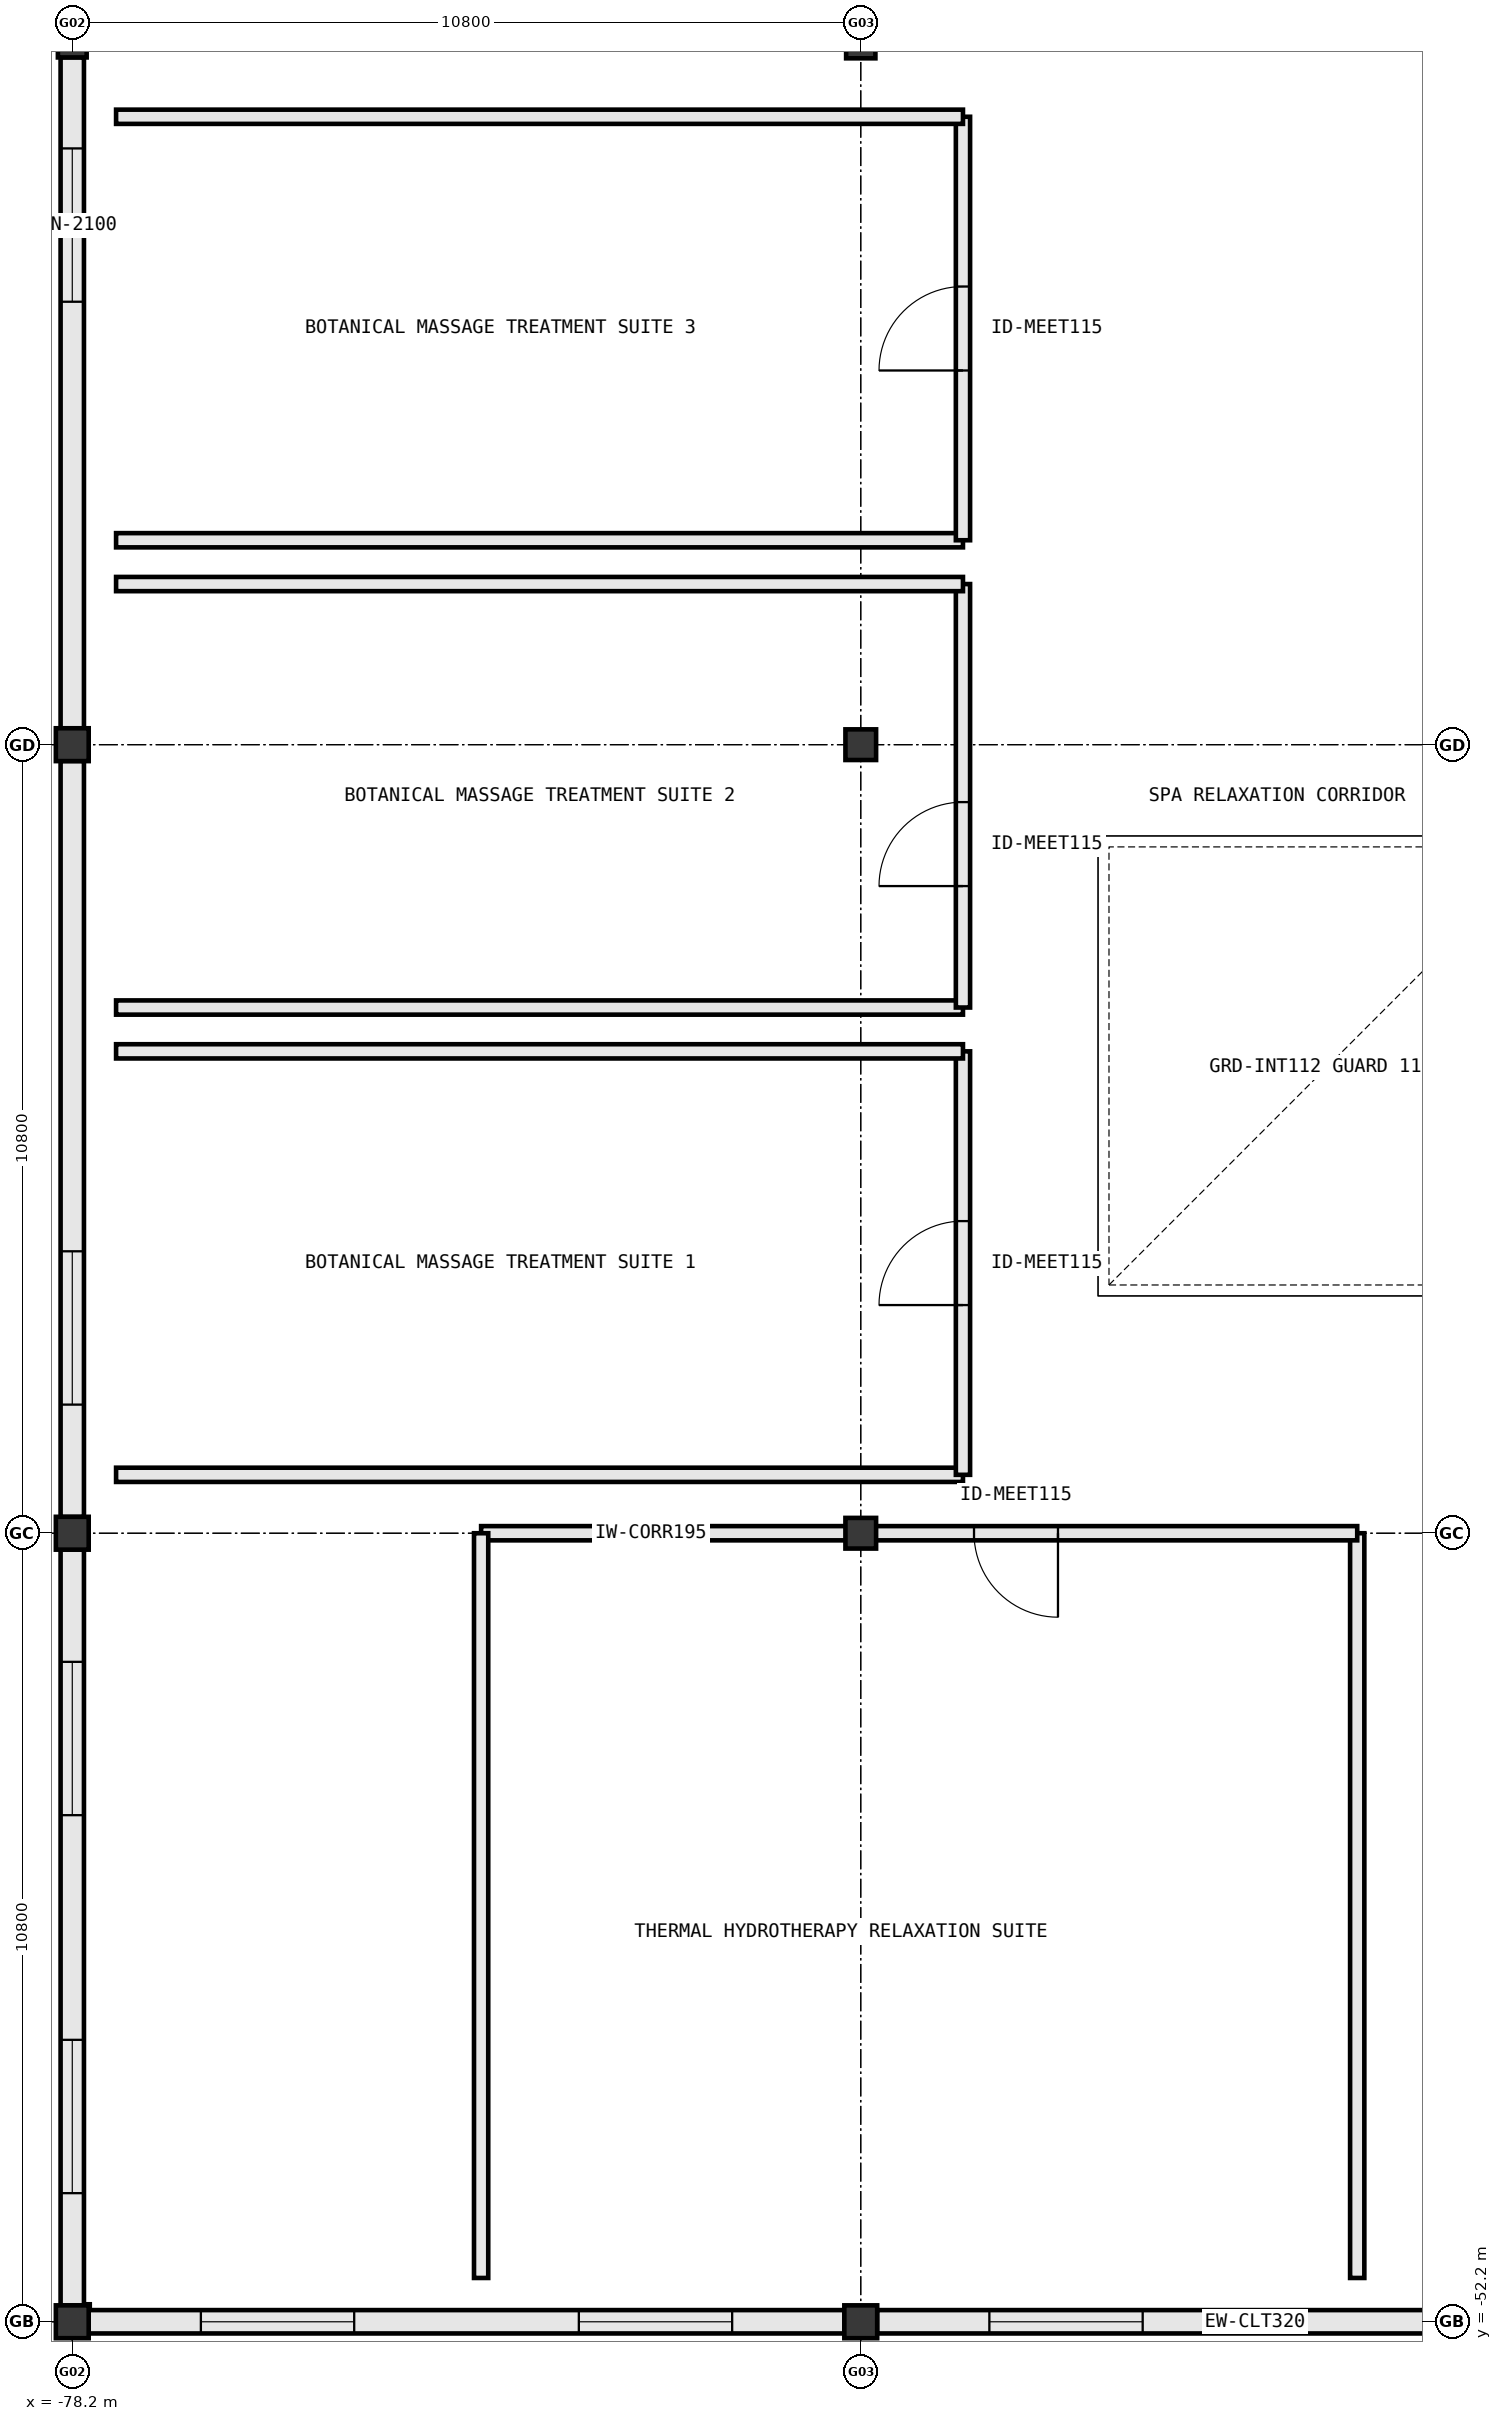
"""IFC4 building model, lengths in metres.
Left out: names, types, materials, properties, quantities, classifications, styles, units other than length and angle.
Written with IfcOpenShell. Run it as: python <this file> out.ifc"""

import sys

from ifc_helpers import new_model, si_unit, direction, frame, frame_2d, origin, origin_2d, place, context, subcontext, project, spatial, rectangle, i_section, extrude, element, fill, save


model = new_model("IFC4")
c1 = context("Model", 3, precision=1e-05, world=origin(), true_north=direction((0.0, 1.0)))
c2 = subcontext(c1, "Body", "Model", "MODEL_VIEW")
j1 = project(units=[si_unit("LENGTHUNIT", "METRE"), si_unit("PLANEANGLEUNIT", "RADIAN")], contexts=[c1])
p1 = place(None, origin())
s1 = spatial("IfcSite", under=j1, at=p1, CompositionType="ELEMENT")
p2 = place(p1, origin())
s2 = spatial("IfcBuilding", under=s1, at=p2, CompositionType="ELEMENT")
p3 = place(p2, frame((0.0, 0.0, 5.4)))
s3 = spatial("IfcBuildingStorey", under=s2, at=p3, CompositionType="ELEMENT", Elevation=5.4)
p4 = place(p3, frame((-78.2, -21.0, 0.0), z_axis=(0.0, 0.0, 1.0), x_axis=(1.0, 0.0, 0.0)))
e1 = element("IfcColumn", 1, at=p4, inside=s3, PredefinedType="COLUMN", context=c2, shape_type="SweptSolid", body=[
    extrude(i_section(OverallWidth=0.394, OverallDepth=0.375, WebThickness=0.017, FlangeThickness=0.028, at=origin_2d()), origin(), (0.0, 0.0, 1.0), 5.4),
])
p5 = place(p3, frame((-67.4, -21.0, 0.0), z_axis=(0.0, 0.0, 1.0), x_axis=(1.0, 0.0, 0.0)))
e2 = element("IfcColumn", 2, at=p5, inside=s3, PredefinedType="COLUMN", context=c2, shape_type="SweptSolid", body=[
    extrude(i_section(OverallWidth=0.401, OverallDepth=0.399, WebThickness=0.025, FlangeThickness=0.04, at=origin_2d()), origin(), (0.0, 0.0, 1.0), 5.4),
])
for number, where, z_axis, x_axis in (
    (3, (-78.2, -52.2, 0.0), (0.0, 0.0, 1.0), (1.0, 0.0, 0.0)),
    (4, (-78.2, -41.4, 0.0), (0.0, 0.0, 1.0), (1.0, 0.0, 0.0)),
    (5, (-78.2, -30.6, 0.0), (0.0, 0.0, 1.0), (1.0, 0.0, 0.0)),
    (6, (-67.4, -52.2, 0.0), (0.0, 0.0, 1.0), (1.0, 0.0, 0.0)),
):
    element("IfcColumn", number, at=place(p3, frame(where, z_axis=z_axis, x_axis=x_axis)), inside=s3, PredefinedType="COLUMN", context=c2, shape_type="SweptSolid", body=[
        extrude(rectangle(XDim=0.45, YDim=0.45, at=origin_2d()), origin(), (0.0, 0.0, 1.0), 5.4),
    ])
for number, where, z_axis, x_axis in (
    (7, (-67.4, -41.4, 0.0), (0.0, 0.0, 1.0), (1.0, 0.0, 0.0)),
    (8, (-67.4, -30.6, 0.0), (0.0, 0.0, 1.0), (1.0, 0.0, 0.0)),
):
    element("IfcColumn", number, at=place(p3, frame(where, z_axis=z_axis, x_axis=x_axis)), inside=s3, PredefinedType="COLUMN", context=c2, shape_type="SweptSolid", body=[
        extrude(rectangle(XDim=0.42, YDim=0.42, at=origin_2d()), origin(), (0.0, 0.0, 1.0), 5.4),
    ])
p6 = place(p3, frame((-78.2, -21.186, 0.0), z_axis=(0.0, 0.0, 1.0), x_axis=(0.0, -1.0, 0.0)))
e9 = element("IfcWall", 9, at=p6, inside=s3, PredefinedType="STANDARD", context=c2, shape_type="SweptSolid", body=[
    extrude(rectangle(XDim=9.191, YDim=0.32, at=frame_2d((4.596, 0.0))), origin(), (0.0, 0.0, 1.0), 4.429),
])
p7 = place(p6, frame((1.248, 0.0, 0.85)))
e10 = element("IfcOpeningElement", 10, at=p7, cuts=e9, PredefinedType="OPENING", context=c2, shape_type="SweptSolid", body=[
    extrude(rectangle(XDim=2.1, YDim=1.95, at=frame_2d((1.05, 0.975))), frame((0.0, 0.172, 0.0), z_axis=(0.0, -1.0, 0.0), x_axis=(1.0, 0.0, 0.0)), (0.0, 0.0, 1.0), 0.344),
])
p8 = place(p3, frame((-78.2, -30.823, 0.0), z_axis=(0.0, 0.0, 1.0), x_axis=(0.0, -1.0, 0.0)))
e11 = element("IfcWall", 11, at=p8, inside=s3, PredefinedType="STANDARD", context=c2, shape_type="SweptSolid", body=[
    extrude(rectangle(XDim=10.354, YDim=0.32, at=frame_2d((5.177, 0.0))), origin(), (0.0, 0.0, 1.0), 4.429),
])
p9 = place(p8, frame((6.716, 0.0, 0.85)))
e12 = element("IfcOpeningElement", 12, at=p9, cuts=e11, PredefinedType="OPENING", context=c2, shape_type="SweptSolid", body=[
    extrude(rectangle(XDim=2.1, YDim=1.95, at=frame_2d((1.05, 0.975))), frame((0.0, 0.172, 0.0), z_axis=(0.0, -1.0, 0.0), x_axis=(1.0, 0.0, 0.0)), (0.0, 0.0, 1.0), 0.344),
])
p10 = place(p3, frame((-78.2, -41.623, 0.0), z_axis=(0.0, 0.0, 1.0), x_axis=(0.0, -1.0, 0.0)))
e13 = element("IfcWall", 13, at=p10, inside=s3, PredefinedType="STANDARD", context=c2, shape_type="SweptSolid", body=[
    extrude(rectangle(XDim=10.354, YDim=0.32, at=frame_2d((5.177, 0.0))), origin(), (0.0, 0.0, 1.0), 4.429),
])
p11 = place(p10, frame((1.539, 0.0, 0.85)))
e14 = element("IfcOpeningElement", 14, at=p11, cuts=e13, PredefinedType="OPENING", context=c2, shape_type="SweptSolid", body=[
    extrude(rectangle(XDim=2.1, YDim=1.95, at=frame_2d((1.05, 0.975))), frame((0.0, 0.172, 0.0), z_axis=(0.0, -1.0, 0.0), x_axis=(1.0, 0.0, 0.0)), (0.0, 0.0, 1.0), 0.344),
])
p12 = place(p10, frame((6.716, 0.0, 0.85)))
e15 = element("IfcOpeningElement", 15, at=p12, cuts=e13, PredefinedType="OPENING", context=c2, shape_type="SweptSolid", body=[
    extrude(rectangle(XDim=2.1, YDim=1.95, at=frame_2d((1.05, 0.975))), frame((0.0, 0.172, 0.0), z_axis=(0.0, -1.0, 0.0), x_axis=(1.0, 0.0, 0.0)), (0.0, 0.0, 1.0), 0.344),
])
p13 = place(p3, frame((-77.977, -52.2, 0.0), z_axis=(0.0, 0.0, 1.0), x_axis=(1.0, 0.0, 0.0)))
e16 = element("IfcWall", 16, at=p13, inside=s3, PredefinedType="STANDARD", context=c2, shape_type="SweptSolid", body=[
    extrude(rectangle(XDim=10.354, YDim=0.32, at=frame_2d((5.177, 0.0))), origin(), (0.0, 0.0, 1.0), 4.346),
])
p14 = place(p13, frame((1.539, 0.0, 0.85)))
e17 = element("IfcOpeningElement", 17, at=p14, cuts=e16, PredefinedType="OPENING", context=c2, shape_type="SweptSolid", body=[
    extrude(rectangle(XDim=2.1, YDim=1.95, at=frame_2d((1.05, 0.975))), frame((0.0, 0.172, 0.0), z_axis=(0.0, -1.0, 0.0), x_axis=(1.0, 0.0, 0.0)), (0.0, 0.0, 1.0), 0.344),
])
p15 = place(p13, frame((6.716, 0.0, 0.85)))
e18 = element("IfcOpeningElement", 18, at=p15, cuts=e16, PredefinedType="OPENING", context=c2, shape_type="SweptSolid", body=[
    extrude(rectangle(XDim=2.1, YDim=1.95, at=frame_2d((1.05, 0.975))), frame((0.0, 0.172, 0.0), z_axis=(0.0, -1.0, 0.0), x_axis=(1.0, 0.0, 0.0)), (0.0, 0.0, 1.0), 0.344),
])
p16 = place(p3, frame((-67.177, -52.2, 0.0), z_axis=(0.0, 0.0, 1.0), x_axis=(1.0, 0.0, 0.0)))
e19 = element("IfcWall", 19, at=p16, inside=s3, PredefinedType="STANDARD", context=c2, shape_type="SweptSolid", body=[
    extrude(rectangle(XDim=10.354, YDim=0.32, at=frame_2d((5.177, 0.0))), origin(), (0.0, 0.0, 1.0), 4.346),
])
p17 = place(p16, frame((1.539, 0.0, 0.85)))
e20 = element("IfcOpeningElement", 20, at=p17, cuts=e19, PredefinedType="OPENING", context=c2, shape_type="SweptSolid", body=[
    extrude(rectangle(XDim=2.1, YDim=1.95, at=frame_2d((1.05, 0.975))), frame((0.0, 0.172, 0.0), z_axis=(0.0, -1.0, 0.0), x_axis=(1.0, 0.0, 0.0)), (0.0, 0.0, 1.0), 0.344),
])
p18 = place(p3, frame((-77.6, -40.6, 0.0), z_axis=(0.0, 0.0, 1.0), x_axis=(1.0, 0.0, 0.0)))
e21 = element("IfcWall", 21, at=p18, inside=s3, PredefinedType="PARTITIONING", context=c2, shape_type="SweptSolid", body=[
    extrude(rectangle(XDim=11.6, YDim=0.195, at=frame_2d((5.8, 0.0))), origin(), (0.0, 0.0, 1.0), 5.13),
])
p19 = place(p3, frame((-66.0, -40.6, 0.0), z_axis=(0.0, 0.0, 1.0), x_axis=(0.0, 1.0, 0.0)))
e22 = element("IfcWall", 22, at=p19, inside=s3, PredefinedType="PARTITIONING", context=c2, shape_type="SweptSolid", body=[
    extrude(rectangle(XDim=5.8, YDim=0.195, at=frame_2d((2.9, 0.0))), origin(), (0.0, 0.0, 1.0), 5.13),
])
p20 = place(p19, frame((2.325, 0.0, 0.0)))
e23 = element("IfcOpeningElement", 23, at=p20, cuts=e22, PredefinedType="OPENING", context=c2, shape_type="SweptSolid", body=[
    extrude(rectangle(XDim=1.15, YDim=2.2, at=frame_2d((0.575, 1.1))), frame((0.0, 0.11, 0.0), z_axis=(0.0, -1.0, 0.0), x_axis=(1.0, 0.0, 0.0)), (0.0, 0.0, 1.0), 0.219),
])
for number, where, z_axis, x_axis in (
    (24, (-66.0, -34.8, 0.0), (0.0, 0.0, 1.0), (-1.0, 0.0, 0.0)),
    (25, (-77.6, -34.2, 0.0), (0.0, 0.0, 1.0), (1.0, 0.0, 0.0)),
):
    element("IfcWall", number, at=place(p3, frame(where, z_axis=z_axis, x_axis=x_axis)), inside=s3, PredefinedType="PARTITIONING", context=c2, shape_type="SweptSolid", body=[
        extrude(rectangle(XDim=11.6, YDim=0.195, at=frame_2d((5.8, 0.0))), origin(), (0.0, 0.0, 1.0), 5.13),
    ])
p21 = place(p3, frame((-66.0, -34.2, 0.0), z_axis=(0.0, 0.0, 1.0), x_axis=(0.0, 1.0, 0.0)))
e26 = element("IfcWall", 26, at=p21, inside=s3, PredefinedType="PARTITIONING", context=c2, shape_type="SweptSolid", body=[
    extrude(rectangle(XDim=5.8, YDim=0.195, at=frame_2d((2.9, 0.0))), origin(), (0.0, 0.0, 1.0), 5.13),
])
p22 = place(p21, frame((1.664, 0.0, 0.0)))
e27 = element("IfcOpeningElement", 27, at=p22, cuts=e26, PredefinedType="OPENING", context=c2, shape_type="SweptSolid", body=[
    extrude(rectangle(XDim=1.15, YDim=2.2, at=frame_2d((0.575, 1.1))), frame((0.0, 0.11, 0.0), z_axis=(0.0, -1.0, 0.0), x_axis=(1.0, 0.0, 0.0)), (0.0, 0.0, 1.0), 0.219),
])
for number, where, z_axis, x_axis in (
    (28, (-66.0, -28.4, 0.0), (0.0, 0.0, 1.0), (-1.0, 0.0, 0.0)),
    (29, (-77.6, -27.8, 0.0), (0.0, 0.0, 1.0), (1.0, 0.0, 0.0)),
):
    element("IfcWall", number, at=place(p3, frame(where, z_axis=z_axis, x_axis=x_axis)), inside=s3, PredefinedType="PARTITIONING", context=c2, shape_type="SweptSolid", body=[
        extrude(rectangle(XDim=11.6, YDim=0.195, at=frame_2d((5.8, 0.0))), origin(), (0.0, 0.0, 1.0), 5.13),
    ])
p23 = place(p3, frame((-66.0, -27.8, 0.0), z_axis=(0.0, 0.0, 1.0), x_axis=(0.0, 1.0, 0.0)))
e30 = element("IfcWall", 30, at=p23, inside=s3, PredefinedType="PARTITIONING", context=c2, shape_type="SweptSolid", body=[
    extrude(rectangle(XDim=5.8, YDim=0.195, at=frame_2d((2.9, 0.0))), origin(), (0.0, 0.0, 1.0), 5.13),
])
p24 = place(p23, frame((2.325, 0.0, 0.0)))
e31 = element("IfcOpeningElement", 31, at=p24, cuts=e30, PredefinedType="OPENING", context=c2, shape_type="SweptSolid", body=[
    extrude(rectangle(XDim=1.15, YDim=2.2, at=frame_2d((0.575, 1.1))), frame((0.0, 0.11, 0.0), z_axis=(0.0, -1.0, 0.0), x_axis=(1.0, 0.0, 0.0)), (0.0, 0.0, 1.0), 0.219),
])
p25 = place(p3, frame((-66.0, -22.0, 0.0), z_axis=(0.0, 0.0, 1.0), x_axis=(-1.0, 0.0, 0.0)))
e32 = element("IfcWall", 32, at=p25, inside=s3, PredefinedType="PARTITIONING", context=c2, shape_type="SweptSolid", body=[
    extrude(rectangle(XDim=11.6, YDim=0.195, at=frame_2d((5.8, 0.0))), origin(), (0.0, 0.0, 1.0), 5.13),
])
p26 = place(p3, frame((-60.6, -51.6, 0.0), z_axis=(0.0, 0.0, 1.0), x_axis=(0.0, 1.0, 0.0)))
e33 = element("IfcWall", 33, at=p26, inside=s3, PredefinedType="PARTITIONING", context=c2, shape_type="SweptSolid", body=[
    extrude(rectangle(XDim=10.2, YDim=0.195, at=frame_2d((5.1, 0.0))), origin(), (0.0, 0.0, 1.0), 5.13),
])
p27 = place(p3, frame((-60.6, -41.4, 0.0), z_axis=(0.0, 0.0, 1.0), x_axis=(-1.0, 0.0, 0.0)))
e34 = element("IfcWall", 34, at=p27, inside=s3, PredefinedType="PARTITIONING", context=c2, shape_type="SweptSolid", body=[
    extrude(rectangle(XDim=12.0, YDim=0.195, at=frame_2d((6.0, 0.0))), origin(), (0.0, 0.0, 1.0), 4.346),
])
p28 = place(p27, frame((4.099, 0.0, 0.0)))
e35 = element("IfcOpeningElement", 35, at=p28, cuts=e34, PredefinedType="OPENING", context=c2, shape_type="SweptSolid", body=[
    extrude(rectangle(XDim=1.15, YDim=2.2, at=frame_2d((0.575, 1.1))), frame((0.0, 0.11, 0.0), z_axis=(0.0, -1.0, 0.0), x_axis=(1.0, 0.0, 0.0)), (0.0, 0.0, 1.0), 0.219),
])
p29 = place(p3, frame((-72.6, -41.4, 0.0), z_axis=(0.0, 0.0, 1.0), x_axis=(0.0, -1.0, 0.0)))
e36 = element("IfcWall", 36, at=p29, inside=s3, PredefinedType="PARTITIONING", context=c2, shape_type="SweptSolid", body=[
    extrude(rectangle(XDim=10.2, YDim=0.195, at=frame_2d((5.1, 0.0))), origin(), (0.0, 0.0, 1.0), 5.13),
])
p30 = place(p7, origin())
e37 = element("IfcWindow", 37, at=p30, inside=s3, PartitioningType="DOUBLE_PANEL_VERTICAL", PredefinedType="WINDOW", context=c2, shape_type="SweptSolid", body=[
    extrude(rectangle(XDim=2.1, YDim=1.95, at=frame_2d((1.05, 0.975))), frame((0.0, 0.03, 0.0), z_axis=(0.0, -1.0, 0.0), x_axis=(1.0, 0.0, 0.0)), (0.0, 0.0, 1.0), 0.06),
])
fill(e10, e37)
p31 = place(p9, origin())
e38 = element("IfcWindow", 38, at=p31, inside=s3, PartitioningType="DOUBLE_PANEL_VERTICAL", PredefinedType="WINDOW", context=c2, shape_type="SweptSolid", body=[
    extrude(rectangle(XDim=2.1, YDim=1.95, at=frame_2d((1.05, 0.975))), frame((0.0, 0.03, 0.0), z_axis=(0.0, -1.0, 0.0), x_axis=(1.0, 0.0, 0.0)), (0.0, 0.0, 1.0), 0.06),
])
fill(e12, e38)
p32 = place(p11, origin())
e39 = element("IfcWindow", 39, at=p32, inside=s3, PartitioningType="DOUBLE_PANEL_VERTICAL", PredefinedType="WINDOW", context=c2, shape_type="SweptSolid", body=[
    extrude(rectangle(XDim=2.1, YDim=1.95, at=frame_2d((1.05, 0.975))), frame((0.0, 0.03, 0.0), z_axis=(0.0, -1.0, 0.0), x_axis=(1.0, 0.0, 0.0)), (0.0, 0.0, 1.0), 0.06),
])
fill(e14, e39)
p33 = place(p12, origin())
e40 = element("IfcWindow", 40, at=p33, inside=s3, PartitioningType="DOUBLE_PANEL_VERTICAL", PredefinedType="WINDOW", context=c2, shape_type="SweptSolid", body=[
    extrude(rectangle(XDim=2.1, YDim=1.95, at=frame_2d((1.05, 0.975))), frame((0.0, 0.03, 0.0), z_axis=(0.0, -1.0, 0.0), x_axis=(1.0, 0.0, 0.0)), (0.0, 0.0, 1.0), 0.06),
])
fill(e15, e40)
p34 = place(p14, origin())
e41 = element("IfcWindow", 41, at=p34, inside=s3, PartitioningType="DOUBLE_PANEL_VERTICAL", PredefinedType="WINDOW", context=c2, shape_type="SweptSolid", body=[
    extrude(rectangle(XDim=2.1, YDim=1.95, at=frame_2d((1.05, 0.975))), frame((0.0, 0.03, 0.0), z_axis=(0.0, -1.0, 0.0), x_axis=(1.0, 0.0, 0.0)), (0.0, 0.0, 1.0), 0.06),
])
fill(e17, e41)
p35 = place(p15, origin())
e42 = element("IfcWindow", 42, at=p35, inside=s3, PartitioningType="DOUBLE_PANEL_VERTICAL", PredefinedType="WINDOW", context=c2, shape_type="SweptSolid", body=[
    extrude(rectangle(XDim=2.1, YDim=1.95, at=frame_2d((1.05, 0.975))), frame((0.0, 0.03, 0.0), z_axis=(0.0, -1.0, 0.0), x_axis=(1.0, 0.0, 0.0)), (0.0, 0.0, 1.0), 0.06),
])
fill(e18, e42)
p36 = place(p17, origin())
e43 = element("IfcWindow", 43, at=p36, inside=s3, PartitioningType="DOUBLE_PANEL_VERTICAL", PredefinedType="WINDOW", context=c2, shape_type="SweptSolid", body=[
    extrude(rectangle(XDim=2.1, YDim=1.95, at=frame_2d((1.05, 0.975))), frame((0.0, 0.03, 0.0), z_axis=(0.0, -1.0, 0.0), x_axis=(1.0, 0.0, 0.0)), (0.0, 0.0, 1.0), 0.06),
])
fill(e20, e43)
p37 = place(p20, origin())
e44 = element("IfcDoor", 44, at=p37, inside=s3, OperationType="SINGLE_SWING_LEFT", PredefinedType="DOOR", context=c2, shape_type="SweptSolid", body=[
    extrude(rectangle(XDim=1.15, YDim=2.2, at=frame_2d((0.575, 1.1))), frame((0.0, 0.025, 0.0), z_axis=(0.0, -1.0, 0.0), x_axis=(1.0, 0.0, 0.0)), (0.0, 0.0, 1.0), 0.05),
])
fill(e23, e44)
p38 = place(p22, origin())
e45 = element("IfcDoor", 45, at=p38, inside=s3, OperationType="SINGLE_SWING_LEFT", PredefinedType="DOOR", context=c2, shape_type="SweptSolid", body=[
    extrude(rectangle(XDim=1.15, YDim=2.2, at=frame_2d((0.575, 1.1))), frame((0.0, 0.025, 0.0), z_axis=(0.0, -1.0, 0.0), x_axis=(1.0, 0.0, 0.0)), (0.0, 0.0, 1.0), 0.05),
])
fill(e27, e45)
p39 = place(p24, origin())
e46 = element("IfcDoor", 46, at=p39, inside=s3, OperationType="SINGLE_SWING_LEFT", PredefinedType="DOOR", context=c2, shape_type="SweptSolid", body=[
    extrude(rectangle(XDim=1.15, YDim=2.2, at=frame_2d((0.575, 1.1))), frame((0.0, 0.025, 0.0), z_axis=(0.0, -1.0, 0.0), x_axis=(1.0, 0.0, 0.0)), (0.0, 0.0, 1.0), 0.05),
])
fill(e31, e46)
p40 = place(p28, origin())
e47 = element("IfcDoor", 47, at=p40, inside=s3, OperationType="SINGLE_SWING_LEFT", PredefinedType="DOOR", context=c2, shape_type="SweptSolid", body=[
    extrude(rectangle(XDim=1.15, YDim=2.2, at=frame_2d((0.575, 1.1))), frame((0.0, 0.025, 0.0), z_axis=(0.0, -1.0, 0.0), x_axis=(1.0, 0.0, 0.0)), (0.0, 0.0, 1.0), 0.05),
])
fill(e35, e47)
save(model, sys.argv[1])
